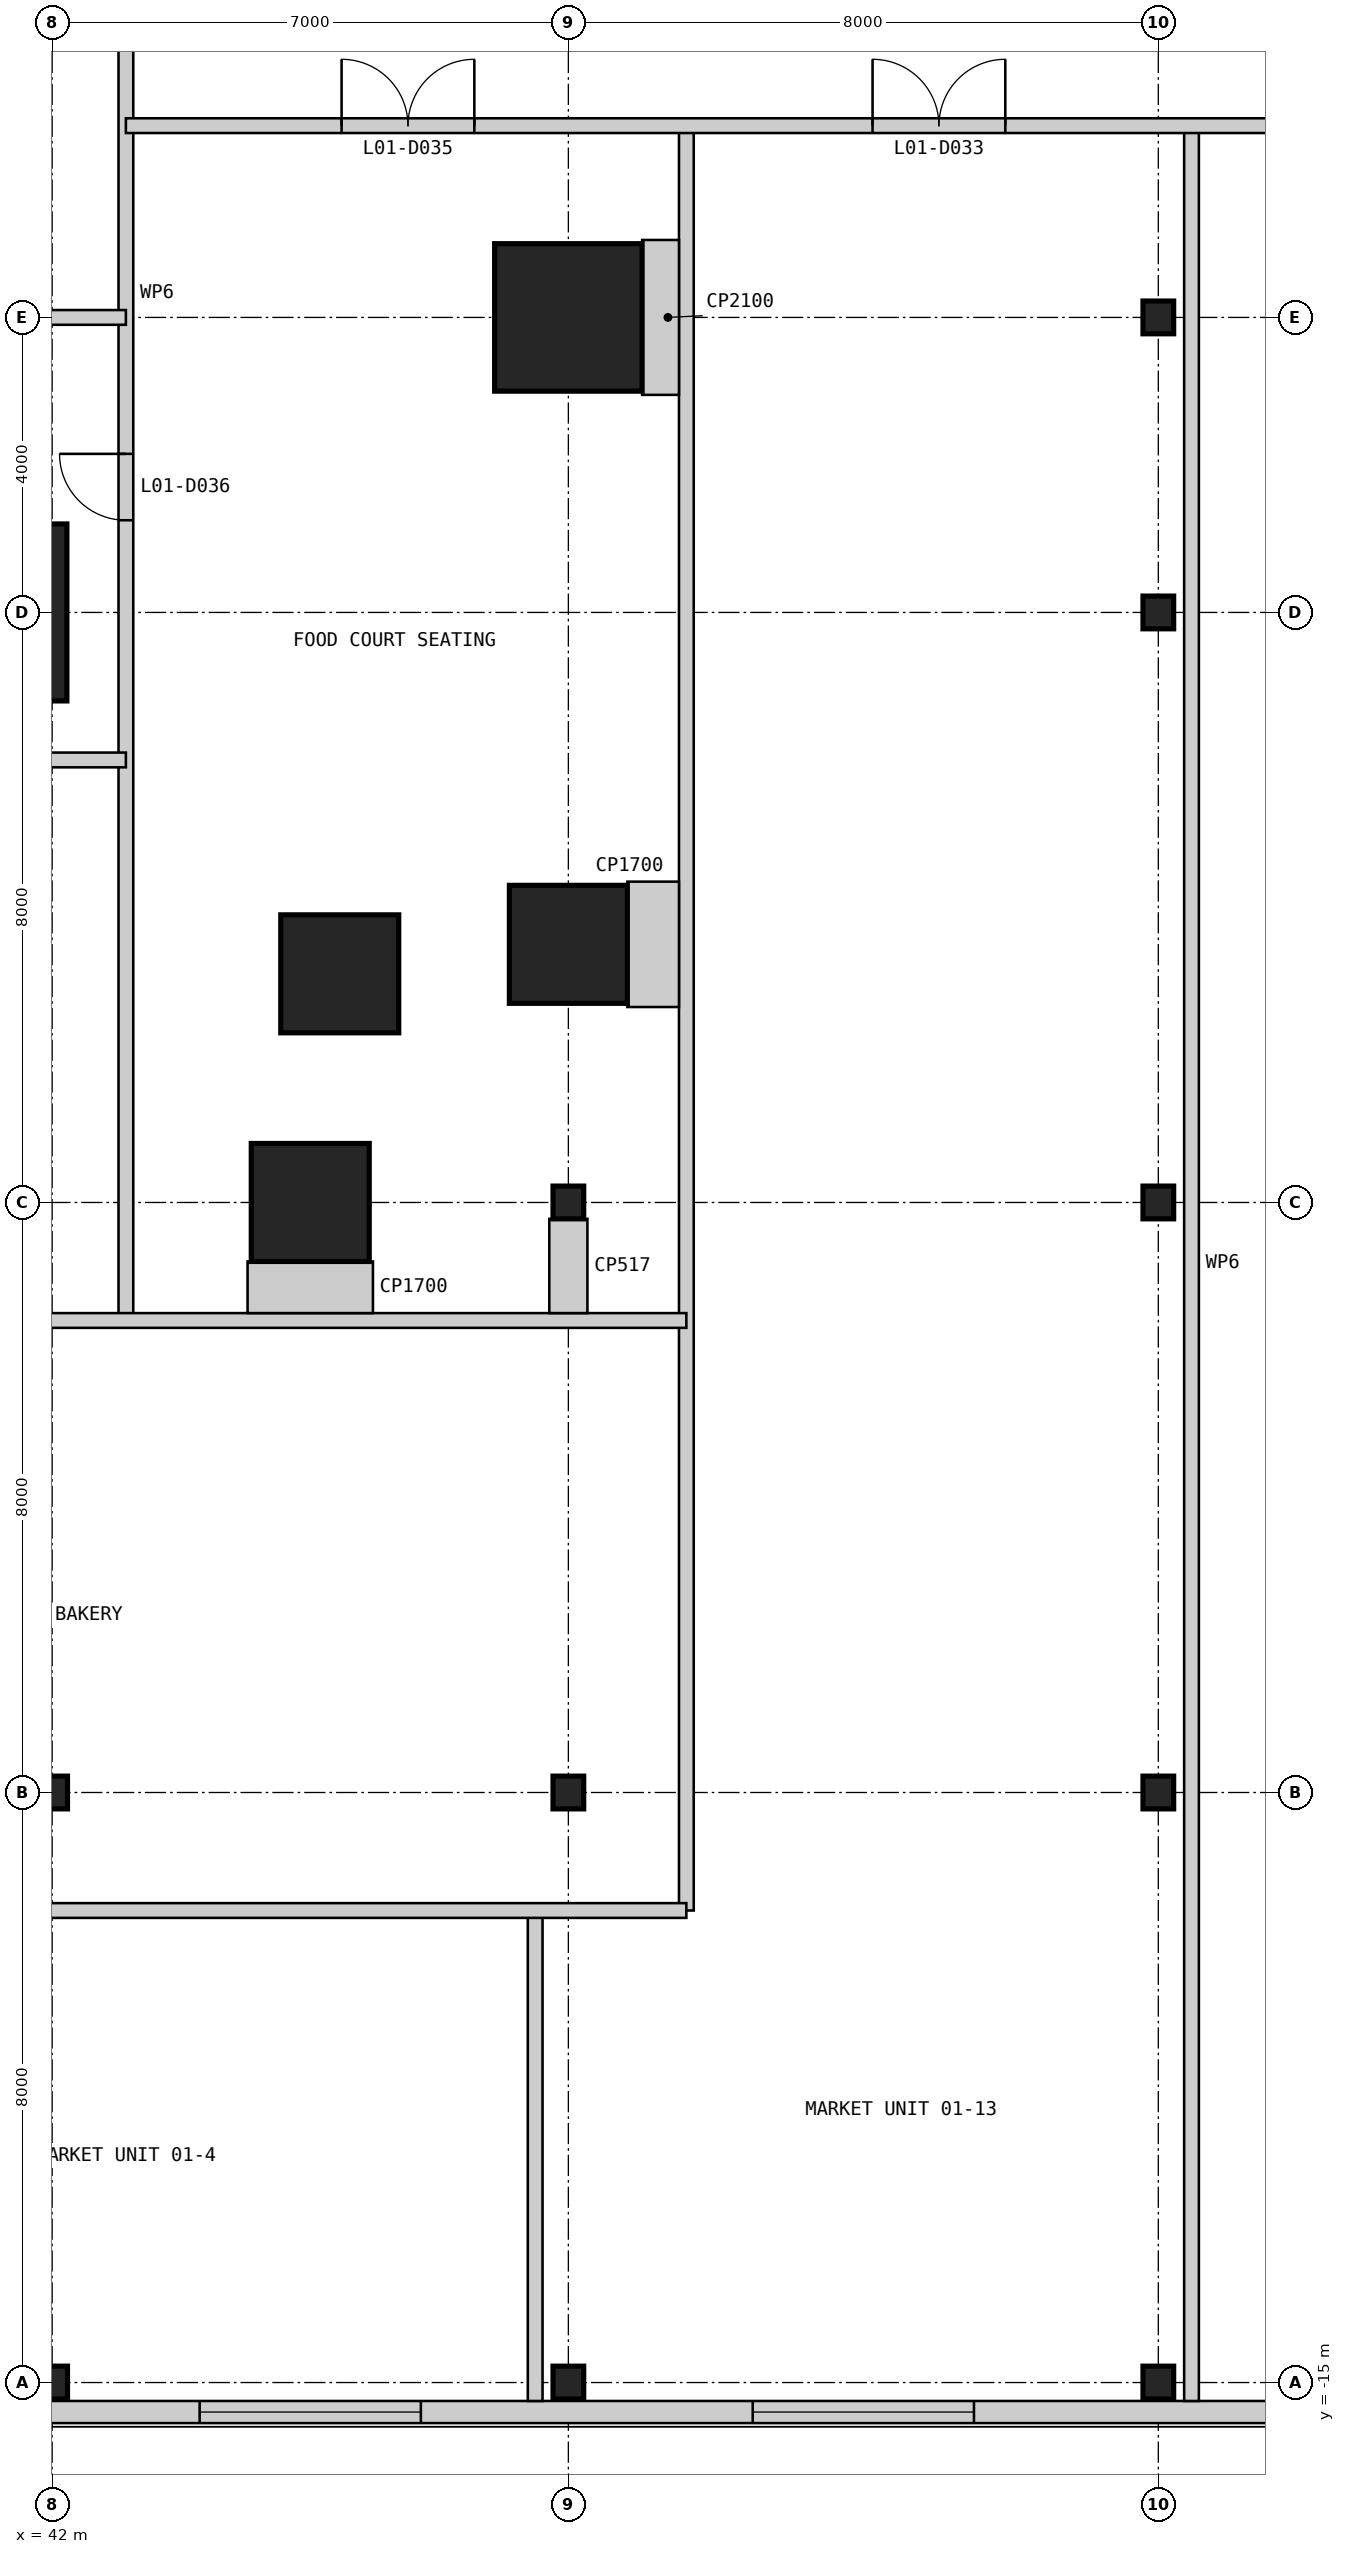
"""IFC4 building model, lengths in metres.
Left out: names, types, materials, properties, quantities, classifications, styles, units other than length and angle.
Written with IfcOpenShell. Run it as: python <this file> out.ifc"""

import sys

from ifc_helpers import new_model, si_unit, direction, frame, frame_2d, origin, origin_2d, place, context, subcontext, project, spatial, rectangle, i_section, extrude, element, fill, save


model = new_model("IFC4")
c1 = context("Model", 3, precision=1e-05, world=origin(), true_north=direction((0.0, 1.0)))
c2 = subcontext(c1, "Body", "Model", "MODEL_VIEW")
j1 = project(units=[si_unit("LENGTHUNIT", "METRE"), si_unit("PLANEANGLEUNIT", "RADIAN")], contexts=[c1])
p1 = place(None, origin())
s1 = spatial("IfcSite", under=j1, at=p1, CompositionType="ELEMENT")
p2 = place(p1, origin())
s2 = spatial("IfcBuilding", under=s1, at=p2, CompositionType="ELEMENT")
p3 = place(p2, frame((0.0, 0.0, 7.0)))
s3 = spatial("IfcBuildingStorey", under=s2, at=p3, CompositionType="ELEMENT", Elevation=7.0)
p4 = place(p3, frame((41.0, 9.0, 0.0), z_axis=(0.0, 0.0, 1.0), x_axis=(1.0, 0.0, 0.0)))
e1 = element("IfcColumn", 1, at=p4, inside=s3, PredefinedType="COLUMN", context=c2, shape_type="SweptSolid", body=[
    extrude(rectangle(XDim=2.4, YDim=2.4, at=origin_2d()), origin(), (0.0, 0.0, 1.0), 4.8),
])
for number, where, z_axis, x_axis in (
    (2, (45.5, 1.0, 0.0), (0.0, 0.0, 1.0), (1.0, 0.0, 0.0)),
    (3, (45.9, 4.1, 0.0), (0.0, 0.0, 1.0), (1.0, 0.0, 0.0)),
    (4, (49.0, 4.5, 0.0), (0.0, 0.0, 1.0), (1.0, 0.0, 0.0)),
):
    element("IfcColumn", number, at=place(p3, frame(where, z_axis=z_axis, x_axis=x_axis)), inside=s3, PredefinedType="COLUMN", context=c2, shape_type="SweptSolid", body=[
        extrude(rectangle(XDim=1.6, YDim=1.6, at=origin_2d()), origin(), (0.0, 0.0, 1.0), 4.8),
    ])
p5 = place(p3, frame((49.0, 13.0, 0.0), z_axis=(0.0, 0.0, 1.0), x_axis=(1.0, 0.0, 0.0)))
e5 = element("IfcColumn", 5, at=p5, inside=s3, PredefinedType="COLUMN", context=c2, shape_type="SweptSolid", body=[
    extrude(rectangle(XDim=2.0, YDim=2.0, at=origin_2d()), origin(), (0.0, 0.0, 1.0), 4.8),
])
for number, where, z_axis, x_axis in (
    (6, (42.0, -15.0, 0.0), (0.0, 0.0, 1.0), (1.0, 0.0, 0.0)),
    (7, (42.0, -7.0, 0.0), (0.0, 0.0, 1.0), (1.0, 0.0, 0.0)),
    (8, (49.0, -15.0, 0.0), (0.0, 0.0, 1.0), (1.0, 0.0, 0.0)),
    (9, (49.0, -7.0, 0.0), (0.0, 0.0, 1.0), (1.0, 0.0, 0.0)),
    (10, (49.0, 1.0, 0.0), (0.0, 0.0, 1.0), (1.0, 0.0, 0.0)),
    (11, (57.0, -15.0, 0.0), (0.0, 0.0, 1.0), (1.0, 0.0, 0.0)),
    (12, (57.0, -7.0, 0.0), (0.0, 0.0, 1.0), (1.0, 0.0, 0.0)),
    (13, (57.0, 1.0, 0.0), (0.0, 0.0, 1.0), (1.0, 0.0, 0.0)),
    (14, (57.0, 9.0, 0.0), (0.0, 0.0, 1.0), (1.0, 0.0, 0.0)),
    (15, (57.0, 13.0, 0.0), (0.0, 0.0, 1.0), (1.0, 0.0, 0.0)),
):
    element("IfcColumn", number, at=place(p3, frame(where, z_axis=z_axis, x_axis=x_axis)), inside=s3, PredefinedType="COLUMN", context=c2, shape_type="SweptSolid", body=[
        extrude(i_section(OverallWidth=0.417, OverallDepth=0.445, WebThickness=0.039, FlangeThickness=0.063, at=origin_2d()), origin(), (0.0, 0.0, 1.0), 4.8),
    ])
p6 = place(p3, frame((-15.55, -15.4, 0.0), z_axis=(0.0, 0.0, 1.0), x_axis=(1.0, 0.0, 0.0)))
e16 = element("IfcWall", 16, at=p6, inside=s3, PredefinedType="SOLIDWALL", context=c2, shape_type="SweptSolid", body=[
    extrude(rectangle(XDim=81.1, YDim=0.3, at=frame_2d((40.55, 0.0))), origin(), (0.0, 0.0, 1.0), 4.5),
])
p7 = place(p6, frame((3.05, 0.0, 0.9)))
e17 = element("IfcOpeningElement", 17, at=p7, cuts=e16, PredefinedType="OPENING", context=c2, shape_type="SweptSolid", body=[
    extrude(rectangle(XDim=3.0, YDim=2.4, at=frame_2d((1.5, 1.2))), frame((0.0, 0.16, 0.0), z_axis=(0.0, -1.0, 0.0), x_axis=(1.0, 0.0, 0.0)), (0.0, 0.0, 1.0), 0.32),
])
p8 = place(p6, frame((11.05, 0.0, 0.9)))
e18 = element("IfcOpeningElement", 18, at=p8, cuts=e16, PredefinedType="OPENING", context=c2, shape_type="SweptSolid", body=[
    extrude(rectangle(XDim=3.0, YDim=2.4, at=frame_2d((1.5, 1.2))), frame((0.0, 0.16, 0.0), z_axis=(0.0, -1.0, 0.0), x_axis=(1.0, 0.0, 0.0)), (0.0, 0.0, 1.0), 0.32),
])
p9 = place(p6, frame((19.05, 0.0, 0.9)))
e19 = element("IfcOpeningElement", 19, at=p9, cuts=e16, PredefinedType="OPENING", context=c2, shape_type="SweptSolid", body=[
    extrude(rectangle(XDim=3.0, YDim=2.4, at=frame_2d((1.5, 1.2))), frame((0.0, 0.16, 0.0), z_axis=(0.0, -1.0, 0.0), x_axis=(1.0, 0.0, 0.0)), (0.0, 0.0, 1.0), 0.32),
])
p10 = place(p6, frame((33.05, 0.0, 0.9)))
e20 = element("IfcOpeningElement", 20, at=p10, cuts=e16, PredefinedType="OPENING", context=c2, shape_type="SweptSolid", body=[
    extrude(rectangle(XDim=3.0, YDim=2.4, at=frame_2d((1.5, 1.2))), frame((0.0, 0.16, 0.0), z_axis=(0.0, -1.0, 0.0), x_axis=(1.0, 0.0, 0.0)), (0.0, 0.0, 1.0), 0.32),
])
p11 = place(p6, frame((45.05, 0.0, 0.9)))
e21 = element("IfcOpeningElement", 21, at=p11, cuts=e16, PredefinedType="OPENING", context=c2, shape_type="SweptSolid", body=[
    extrude(rectangle(XDim=3.0, YDim=2.4, at=frame_2d((1.5, 1.2))), frame((0.0, 0.16, 0.0), z_axis=(0.0, -1.0, 0.0), x_axis=(1.0, 0.0, 0.0)), (0.0, 0.0, 1.0), 0.32),
])
p12 = place(p6, frame((53.55, 0.0, 0.9)))
e22 = element("IfcOpeningElement", 22, at=p12, cuts=e16, PredefinedType="OPENING", context=c2, shape_type="SweptSolid", body=[
    extrude(rectangle(XDim=3.0, YDim=2.4, at=frame_2d((1.5, 1.2))), frame((0.0, 0.16, 0.0), z_axis=(0.0, -1.0, 0.0), x_axis=(1.0, 0.0, 0.0)), (0.0, 0.0, 1.0), 0.32),
])
p13 = place(p6, frame((59.55, 0.0, 0.9)))
e23 = element("IfcOpeningElement", 23, at=p13, cuts=e16, PredefinedType="OPENING", context=c2, shape_type="SweptSolid", body=[
    extrude(rectangle(XDim=3.0, YDim=2.4, at=frame_2d((1.5, 1.2))), frame((0.0, 0.16, 0.0), z_axis=(0.0, -1.0, 0.0), x_axis=(1.0, 0.0, 0.0)), (0.0, 0.0, 1.0), 0.32),
])
p14 = place(p6, frame((67.05, 0.0, 0.9)))
e24 = element("IfcOpeningElement", 24, at=p14, cuts=e16, PredefinedType="OPENING", context=c2, shape_type="SweptSolid", body=[
    extrude(rectangle(XDim=3.0, YDim=2.4, at=frame_2d((1.5, 1.2))), frame((0.0, 0.16, 0.0), z_axis=(0.0, -1.0, 0.0), x_axis=(1.0, 0.0, 0.0)), (0.0, 0.0, 1.0), 0.32),
])
p15 = place(p6, frame((75.05, 0.0, 0.9)))
e25 = element("IfcOpeningElement", 25, at=p15, cuts=e16, PredefinedType="OPENING", context=c2, shape_type="SweptSolid", body=[
    extrude(rectangle(XDim=3.0, YDim=2.4, at=frame_2d((1.5, 1.2))), frame((0.0, 0.16, 0.0), z_axis=(0.0, -1.0, 0.0), x_axis=(1.0, 0.0, 0.0)), (0.0, 0.0, 1.0), 0.32),
])
p16 = place(p3, frame((43.0, -0.6, 0.0), z_axis=(0.0, 0.0, 1.0), x_axis=(0.0, 1.0, 0.0)))
e26 = element("IfcWall", 26, at=p16, inside=s3, PredefinedType="PARTITIONING", context=c2, shape_type="SweptSolid", body=[
    extrude(rectangle(XDim=28.6, YDim=0.2, at=frame_2d((14.3, 0.0))), origin(), (0.0, 0.0, 1.0), 3.843),
])
p17 = place(p16, frame((10.85, 0.0, 0.0)))
e27 = element("IfcOpeningElement", 27, at=p17, cuts=e26, PredefinedType="OPENING", context=c2, shape_type="SweptSolid", body=[
    extrude(rectangle(XDim=0.9, YDim=2.2, at=frame_2d((0.45, 1.1))), frame((0.0, 0.11, 0.0), z_axis=(0.0, -1.0, 0.0), x_axis=(1.0, 0.0, 0.0)), (0.0, 0.0, 1.0), 0.22),
])
p18 = place(p3, frame((48.55, -15.25, 0.0), z_axis=(0.0, 0.0, 1.0), x_axis=(0.0, 1.0, 0.0)))
e28 = element("IfcWall", 28, at=p18, inside=s3, PredefinedType="PARTITIONING", context=c2, shape_type="SweptSolid", body=[
    extrude(rectangle(XDim=6.65, YDim=0.2, at=frame_2d((3.325, 0.0))), origin(), (0.0, 0.0, 1.0), 4.5),
])
p19 = place(p3, frame((50.6, -8.6, 0.0), z_axis=(0.0, 0.0, 1.0), x_axis=(0.0, 1.0, 0.0)))
e29 = element("IfcWall", 29, at=p19, inside=s3, PredefinedType="PARTITIONING", context=c2, shape_type="SweptSolid", body=[
    extrude(rectangle(XDim=24.2, YDim=0.2, at=frame_2d((12.1, 0.0))), origin(), (0.0, 0.0, 1.0), 4.5),
])
p20 = place(p3, frame((57.45, -15.25, 0.0), z_axis=(0.0, 0.0, 1.0), x_axis=(0.0, 1.0, 0.0)))
e30 = element("IfcWall", 30, at=p20, inside=s3, PredefinedType="PARTITIONING", context=c2, shape_type="SweptSolid", body=[
    extrude(rectangle(XDim=30.85, YDim=0.2, at=frame_2d((15.425, 0.0))), origin(), (0.0, 0.0, 1.0), 4.5),
])
for number, where, z_axis, x_axis in (
    (31, (34.4, -8.6, 0.0), (0.0, 0.0, 1.0), (1.0, 0.0, 0.0)),
    (32, (34.4, -0.6, 0.0), (0.0, 0.0, 1.0), (1.0, 0.0, 0.0)),
):
    element("IfcWall", number, at=place(p3, frame(where, z_axis=z_axis, x_axis=x_axis)), inside=s3, PredefinedType="PARTITIONING", context=c2, shape_type="SweptSolid", body=[
        extrude(rectangle(XDim=16.2, YDim=0.2, at=frame_2d((8.1, 0.0))), origin(), (0.0, 0.0, 1.0), 4.5),
    ])
p21 = place(p3, frame((34.4, 7.0, 0.0), z_axis=(0.0, 0.0, 1.0), x_axis=(1.0, 0.0, 0.0)))
e33 = element("IfcWall", 33, at=p21, inside=s3, PredefinedType="PARTITIONING", context=c2, shape_type="SweptSolid", body=[
    extrude(rectangle(XDim=8.6, YDim=0.2, at=frame_2d((4.3, 0.0))), origin(), (0.0, 0.0, 1.0), 4.5),
])
p22 = place(p3, frame((37.0, 13.0, 0.0), z_axis=(0.0, 0.0, 1.0), x_axis=(1.0, 0.0, 0.0)))
e34 = element("IfcWall", 34, at=p22, inside=s3, PredefinedType="PARTITIONING", context=c2, shape_type="SweptSolid", body=[
    extrude(rectangle(XDim=6.0, YDim=0.2, at=frame_2d((3.0, 0.0))), origin(), (0.0, 0.0, 1.0), 3.653),
])
p23 = place(p3, frame((43.0, 15.6, 0.0), z_axis=(0.0, 0.0, 1.0), x_axis=(1.0, 0.0, 0.0)))
e35 = element("IfcWall", 35, at=p23, inside=s3, PredefinedType="PARTITIONING", context=c2, shape_type="SweptSolid", body=[
    extrude(rectangle(XDim=22.25, YDim=0.2, at=frame_2d((11.125, 0.0))), origin(), (0.0, 0.0, 1.0), 4.5),
])
p24 = place(p23, frame((10.125, 0.0, 0.0)))
e36 = element("IfcOpeningElement", 36, at=p24, cuts=e35, PredefinedType="OPENING", context=c2, shape_type="SweptSolid", body=[
    extrude(rectangle(XDim=1.8, YDim=2.4, at=frame_2d((0.9, 1.2))), frame((0.0, 0.11, 0.0), z_axis=(0.0, -1.0, 0.0), x_axis=(1.0, 0.0, 0.0)), (0.0, 0.0, 1.0), 0.22),
])
p25 = place(p23, frame((17.425, 0.0, 0.0)))
e37 = element("IfcOpeningElement", 37, at=p25, cuts=e35, PredefinedType="OPENING", context=c2, shape_type="SweptSolid", body=[
    extrude(rectangle(XDim=1.8, YDim=2.4, at=frame_2d((0.9, 1.2))), frame((0.0, 0.11, 0.0), z_axis=(0.0, -1.0, 0.0), x_axis=(1.0, 0.0, 0.0)), (0.0, 0.0, 1.0), 0.22),
])
p26 = place(p23, frame((2.925, 0.0, 0.0)))
e38 = element("IfcOpeningElement", 38, at=p26, cuts=e35, PredefinedType="OPENING", context=c2, shape_type="SweptSolid", body=[
    extrude(rectangle(XDim=1.8, YDim=2.4, at=frame_2d((0.9, 1.2))), frame((0.0, 0.11, 0.0), z_axis=(0.0, -1.0, 0.0), x_axis=(1.0, 0.0, 0.0)), (0.0, 0.0, 1.0), 0.22),
])
for number, where, z_axis, x_axis in (
    (39, (45.5, -0.5, 0.0), (0.0, 0.0, 1.0), (0.0, 1.0, 0.0)),
    (40, (50.5, 4.5, 0.0), (0.0, 0.0, 1.0), (-1.0, 0.0, 0.0)),
):
    element("IfcWall", number, at=place(p3, frame(where, z_axis=z_axis, x_axis=x_axis)), inside=s3, PredefinedType="PARTITIONING", context=c2, shape_type="SweptSolid", body=[
        extrude(rectangle(XDim=0.7, YDim=1.7, at=frame_2d((0.35, 0.0))), origin(), (0.0, 0.0, 1.0), 4.5),
    ])
p27 = place(p3, frame((50.5, 13.0, 0.0), z_axis=(0.0, 0.0, 1.0), x_axis=(-1.0, 0.0, 0.0)))
e41 = element("IfcWall", 41, at=p27, inside=s3, PredefinedType="PARTITIONING", context=c2, shape_type="SweptSolid", body=[
    extrude(rectangle(XDim=0.5, YDim=2.1, at=frame_2d((0.25, 0.0))), origin(), (0.0, 0.0, 1.0), 4.5),
])
p28 = place(p3, frame((49.0, -0.5, 0.0), z_axis=(0.0, 0.0, 1.0), x_axis=(0.0, 1.0, 0.0)))
e42 = element("IfcWall", 42, at=p28, inside=s3, PredefinedType="PARTITIONING", context=c2, shape_type="SweptSolid", body=[
    extrude(rectangle(XDim=1.278, YDim=0.517, at=frame_2d((0.639, 0.0))), origin(), (0.0, 0.0, 1.0), 3.754),
])
p29 = place(p13, origin())
e43 = element("IfcWindow", 43, at=p29, inside=s3, PartitioningType="SINGLE_PANEL", PredefinedType="WINDOW", context=c2, shape_type="SweptSolid", body=[
    extrude(rectangle(XDim=3.0, YDim=2.4, at=frame_2d((1.5, 1.2))), frame((0.0, 0.03, 0.0), z_axis=(0.0, -1.0, 0.0), x_axis=(1.0, 0.0, 0.0)), (0.0, 0.0, 1.0), 0.06),
])
fill(e23, e43)
p30 = place(p14, origin())
e44 = element("IfcWindow", 44, at=p30, inside=s3, PartitioningType="SINGLE_PANEL", PredefinedType="WINDOW", context=c2, shape_type="SweptSolid", body=[
    extrude(rectangle(XDim=3.0, YDim=2.4, at=frame_2d((1.5, 1.2))), frame((0.0, 0.03, 0.0), z_axis=(0.0, -1.0, 0.0), x_axis=(1.0, 0.0, 0.0)), (0.0, 0.0, 1.0), 0.06),
])
fill(e24, e44)
p31 = place(p24, origin())
e45 = element("IfcDoor", 45, at=p31, inside=s3, OperationType="DOUBLE_DOOR_SINGLE_SWING", PredefinedType="DOOR", context=c2, shape_type="SweptSolid", body=[
    extrude(rectangle(XDim=1.8, YDim=2.4, at=frame_2d((0.9, 1.2))), frame((0.0, 0.025, 0.0), z_axis=(0.0, -1.0, 0.0), x_axis=(1.0, 0.0, 0.0)), (0.0, 0.0, 1.0), 0.05),
])
fill(e36, e45)
p32 = place(p26, origin())
e46 = element("IfcDoor", 46, at=p32, inside=s3, OperationType="DOUBLE_DOOR_SINGLE_SWING", PredefinedType="DOOR", context=c2, shape_type="SweptSolid", body=[
    extrude(rectangle(XDim=1.8, YDim=2.4, at=frame_2d((0.9, 1.2))), frame((0.0, 0.025, 0.0), z_axis=(0.0, -1.0, 0.0), x_axis=(1.0, 0.0, 0.0)), (0.0, 0.0, 1.0), 0.05),
])
fill(e38, e46)
p33 = place(p17, origin())
e47 = element("IfcDoor", 47, at=p33, inside=s3, OperationType="SINGLE_SWING_RIGHT", PredefinedType="DOOR", context=c2, shape_type="SweptSolid", body=[
    extrude(rectangle(XDim=0.9, YDim=2.2, at=frame_2d((0.45, 1.1))), frame((0.0, 0.025, 0.0), z_axis=(0.0, -1.0, 0.0), x_axis=(1.0, 0.0, 0.0)), (0.0, 0.0, 1.0), 0.05),
])
fill(e27, e47)
save(model, sys.argv[1])
